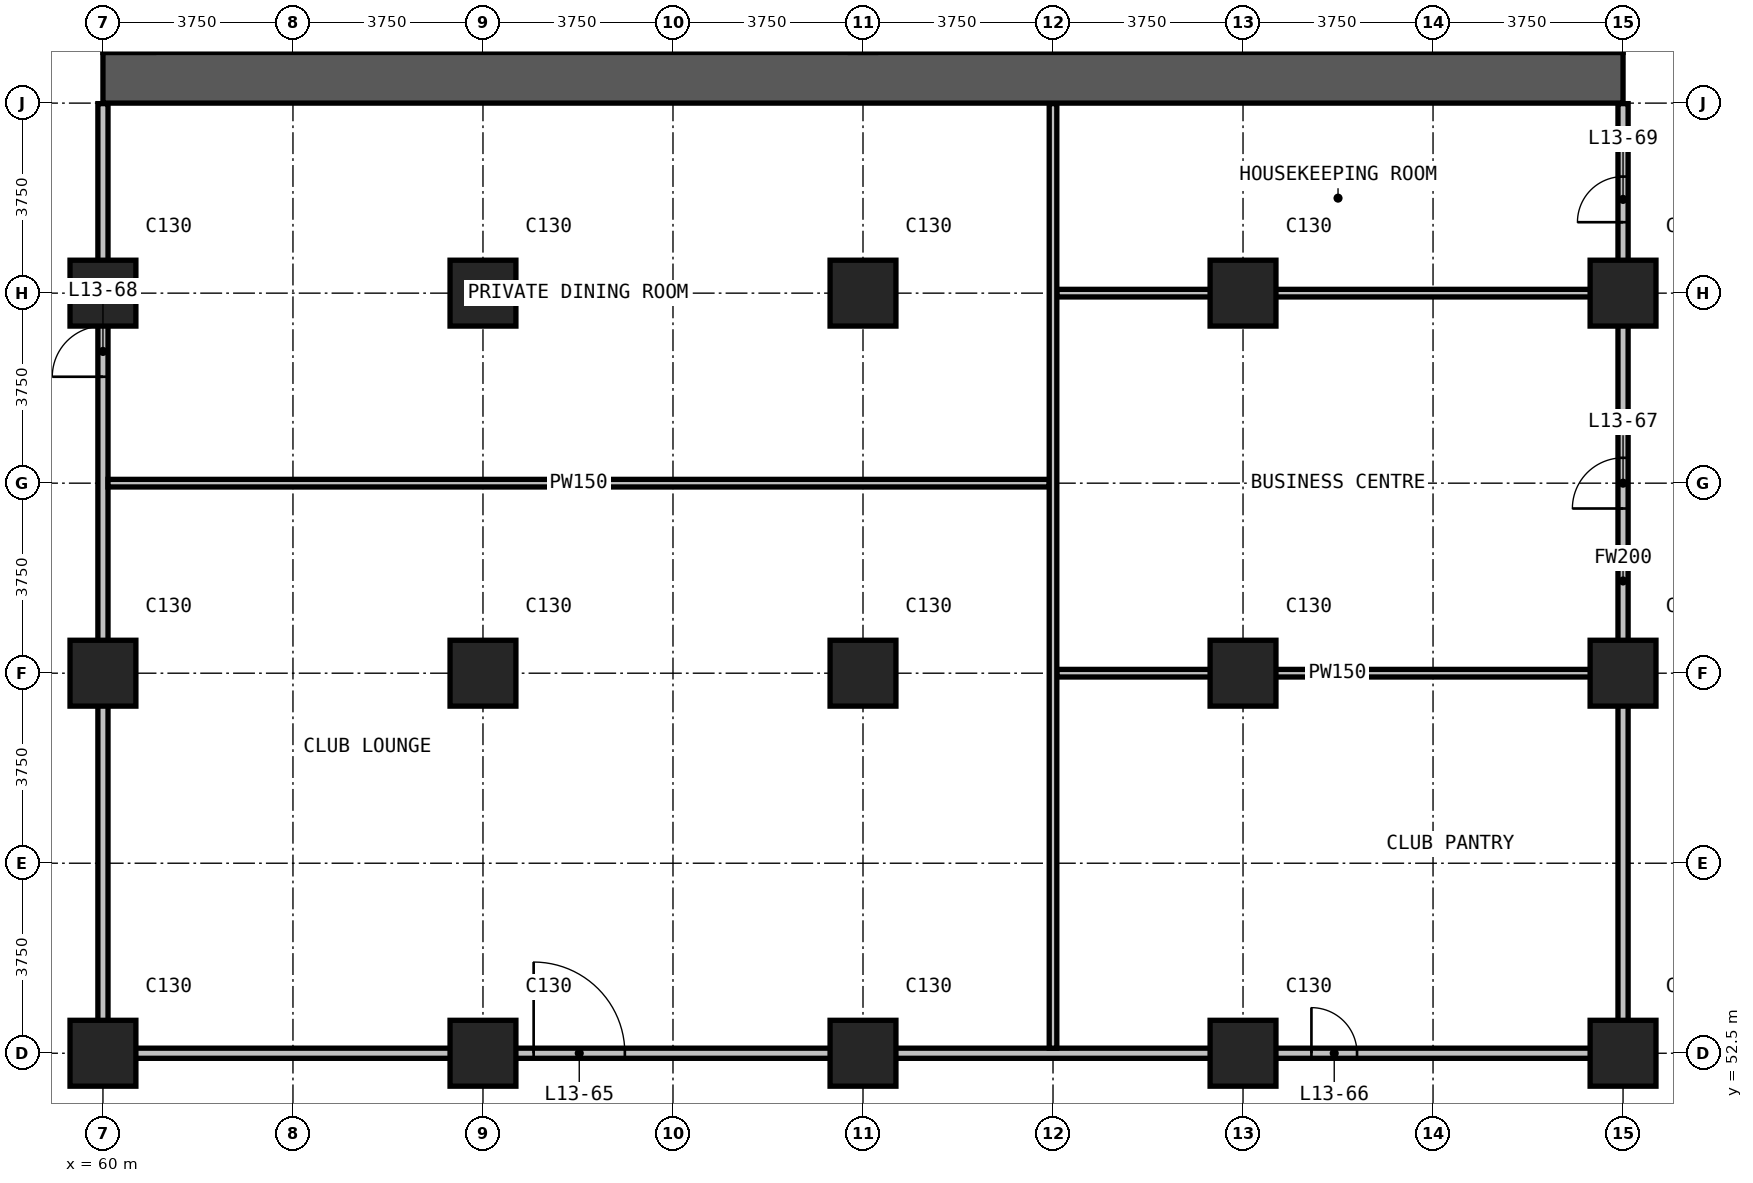
"""IFC4 building model, lengths in metres.
Left out: names, types, materials, properties, quantities, classifications, styles, units other than length and angle.
Written with IfcOpenShell. Run it as: python <this file> out.ifc"""

import sys

from ifc_helpers import new_model, si_unit, direction, frame, frame_2d, origin, origin_2d, place, context, subcontext, project, spatial, rectangle, extrude, element, fill, save


model = new_model("IFC4")
c1 = context("Model", 3, precision=1e-05, world=origin(), true_north=direction((0.0, 1.0)))
c2 = subcontext(c1, "Body", "Model", "MODEL_VIEW")
j1 = project(units=[si_unit("LENGTHUNIT", "METRE"), si_unit("PLANEANGLEUNIT", "RADIAN")], contexts=[c1])
p1 = place(None, origin())
s1 = spatial("IfcSite", under=j1, at=p1, CompositionType="ELEMENT")
p2 = place(p1, origin())
s2 = spatial("IfcBuilding", under=s1, at=p2, CompositionType="ELEMENT")
p3 = place(p2, frame((0.0, 0.0, 62.6)))
s3 = spatial("IfcBuildingStorey", under=s2, at=p3, CompositionType="ELEMENT", Elevation=62.6)
for number, where, z_axis, x_axis in (
    (1, (60.0, 52.5, 0.0), (0.0, 0.0, 1.0), (1.0, 0.0, 0.0)),
    (2, (60.0, 60.0, 0.0), (0.0, 0.0, 1.0), (1.0, 0.0, 0.0)),
    (3, (60.0, 67.5, 0.0), (0.0, 0.0, 1.0), (1.0, 0.0, 0.0)),
    (4, (67.5, 52.5, 0.0), (0.0, 0.0, 1.0), (1.0, 0.0, 0.0)),
    (5, (67.5, 60.0, 0.0), (0.0, 0.0, 1.0), (1.0, 0.0, 0.0)),
    (6, (67.5, 67.5, 0.0), (0.0, 0.0, 1.0), (1.0, 0.0, 0.0)),
    (7, (75.0, 52.5, 0.0), (0.0, 0.0, 1.0), (1.0, 0.0, 0.0)),
    (8, (75.0, 60.0, 0.0), (0.0, 0.0, 1.0), (1.0, 0.0, 0.0)),
    (9, (75.0, 67.5, 0.0), (0.0, 0.0, 1.0), (1.0, 0.0, 0.0)),
    (10, (82.5, 52.5, 0.0), (0.0, 0.0, 1.0), (1.0, 0.0, 0.0)),
    (11, (82.5, 60.0, 0.0), (0.0, 0.0, 1.0), (1.0, 0.0, 0.0)),
    (12, (82.5, 67.5, 0.0), (0.0, 0.0, 1.0), (1.0, 0.0, 0.0)),
    (13, (90.0, 52.5, 0.0), (0.0, 0.0, 1.0), (1.0, 0.0, 0.0)),
    (14, (90.0, 60.0, 0.0), (0.0, 0.0, 1.0), (1.0, 0.0, 0.0)),
    (15, (90.0, 67.5, 0.0), (0.0, 0.0, 1.0), (1.0, 0.0, 0.0)),
):
    element("IfcColumn", number, at=place(p3, frame(where, z_axis=z_axis, x_axis=x_axis)), inside=s3, PredefinedType="COLUMN", context=c2, shape_type="SweptSolid", body=[
        extrude(rectangle(XDim=1.3, YDim=1.3, at=origin_2d()), origin(), (0.0, 0.0, 1.0), 3.3),
    ])
p4 = place(p3, frame((60.0, 71.75, 0.0), z_axis=(0.0, 0.0, 1.0), x_axis=(1.0, 0.0, 0.0)))
e16 = element("IfcWall", 16, at=p4, inside=s3, PredefinedType="SHEAR", context=c2, shape_type="SweptSolid", body=[
    extrude(rectangle(XDim=30.0, YDim=1.0, at=frame_2d((15.0, 0.0))), origin(), (0.0, 0.0, 1.0), 3.3),
])
p5 = place(p3, frame((60.1, 52.5, 0.0), z_axis=(0.0, 0.0, 1.0), x_axis=(1.0, 0.0, 0.0)))
e17 = element("IfcWall", 17, at=p5, inside=s3, PredefinedType="PARTITIONING", context=c2, shape_type="SweptSolid", body=[
    extrude(rectangle(XDim=29.8, YDim=0.2, at=frame_2d((14.9, 0.0))), origin(), (0.0, 0.0, 1.0), 3.0),
])
p6 = place(p5, frame((8.4, 0.0, 0.0)))
e18 = element("IfcOpeningElement", 18, at=p6, cuts=e17, PredefinedType="OPENING", context=c2, shape_type="SweptSolid", body=[
    extrude(rectangle(XDim=1.8, YDim=2.2, at=frame_2d((0.9, 1.1))), frame((0.0, 0.11, 0.0), z_axis=(0.0, -1.0, 0.0), x_axis=(1.0, 0.0, 0.0)), (0.0, 0.0, 1.0), 0.22),
])
p7 = place(p5, frame((23.75, 0.0, 0.0)))
e19 = element("IfcOpeningElement", 19, at=p7, cuts=e17, PredefinedType="OPENING", context=c2, shape_type="SweptSolid", body=[
    extrude(rectangle(XDim=0.9, YDim=2.2, at=frame_2d((0.45, 1.1))), frame((0.0, 0.11, 0.0), z_axis=(0.0, -1.0, 0.0), x_axis=(1.0, 0.0, 0.0)), (0.0, 0.0, 1.0), 0.22),
])
p8 = place(p3, frame((60.0, 52.4, 0.0), z_axis=(0.0, 0.0, 1.0), x_axis=(0.0, 1.0, 0.0)))
e20 = element("IfcWall", 20, at=p8, inside=s3, PredefinedType="PARTITIONING", context=c2, shape_type="SweptSolid", body=[
    extrude(rectangle(XDim=18.84, YDim=0.2, at=frame_2d((9.42, 0.0))), origin(), (0.0, 0.0, 1.0), 3.0),
])
p9 = place(p8, frame((13.45, 0.0, 0.0)))
e21 = element("IfcOpeningElement", 21, at=p9, cuts=e20, PredefinedType="OPENING", context=c2, shape_type="SweptSolid", body=[
    extrude(rectangle(XDim=1.0, YDim=2.2, at=frame_2d((0.5, 1.1))), frame((0.0, 0.11, 0.0), z_axis=(0.0, -1.0, 0.0), x_axis=(1.0, 0.0, 0.0)), (0.0, 0.0, 1.0), 0.22),
])
p10 = place(p3, frame((90.0, 52.4, 0.0), z_axis=(0.0, 0.0, 1.0), x_axis=(0.0, 1.0, 0.0)))
e22 = element("IfcWall", 22, at=p10, inside=s3, PredefinedType="PARTITIONING", context=c2, shape_type="SweptSolid", body=[
    extrude(rectangle(XDim=18.84, YDim=0.2, at=frame_2d((9.42, 0.0))), origin(), (0.0, 0.0, 1.0), 3.0),
])
p11 = place(p10, frame((10.85, 0.0, 0.0)))
e23 = element("IfcOpeningElement", 23, at=p11, cuts=e22, PredefinedType="OPENING", context=c2, shape_type="SweptSolid", body=[
    extrude(rectangle(XDim=1.0, YDim=2.2, at=frame_2d((0.5, 1.1))), frame((0.0, 0.11, 0.0), z_axis=(0.0, -1.0, 0.0), x_axis=(1.0, 0.0, 0.0)), (0.0, 0.0, 1.0), 0.22),
])
p12 = place(p10, frame((16.5, 0.0, 0.0)))
e24 = element("IfcOpeningElement", 24, at=p12, cuts=e22, PredefinedType="OPENING", context=c2, shape_type="SweptSolid", body=[
    extrude(rectangle(XDim=0.9, YDim=2.2, at=frame_2d((0.45, 1.1))), frame((0.0, 0.11, 0.0), z_axis=(0.0, -1.0, 0.0), x_axis=(1.0, 0.0, 0.0)), (0.0, 0.0, 1.0), 0.22),
])
p13 = place(p3, frame((78.825, 60.0, 0.0), z_axis=(0.0, 0.0, 1.0), x_axis=(1.0, 0.0, 0.0)))
e25 = element("IfcWall", 25, at=p13, inside=s3, PredefinedType="PARTITIONING", context=c2, shape_type="SweptSolid", body=[
    extrude(rectangle(XDim=11.075, YDim=0.15, at=frame_2d((5.538, 0.0))), origin(), (0.0, 0.0, 1.0), 3.0),
])
p14 = place(p3, frame((60.1, 63.75, 0.0), z_axis=(0.0, 0.0, 1.0), x_axis=(1.0, 0.0, 0.0)))
e26 = element("IfcWall", 26, at=p14, inside=s3, PredefinedType="PARTITIONING", context=c2, shape_type="SweptSolid", body=[
    extrude(rectangle(XDim=18.575, YDim=0.15, at=frame_2d((9.288, 0.0))), origin(), (0.0, 0.0, 1.0), 3.0),
])
p15 = place(p3, frame((78.825, 67.5, 0.0), z_axis=(0.0, 0.0, 1.0), x_axis=(1.0, 0.0, 0.0)))
e27 = element("IfcWall", 27, at=p15, inside=s3, PredefinedType="PARTITIONING", context=c2, shape_type="SweptSolid", body=[
    extrude(rectangle(XDim=11.075, YDim=0.15, at=frame_2d((5.538, 0.0))), origin(), (0.0, 0.0, 1.0), 3.0),
])
p16 = place(p3, frame((78.75, 52.6, 0.0), z_axis=(0.0, 0.0, 1.0), x_axis=(0.0, 1.0, 0.0)))
e28 = element("IfcWall", 28, at=p16, inside=s3, PredefinedType="PARTITIONING", context=c2, shape_type="SweptSolid", body=[
    extrude(rectangle(XDim=18.64, YDim=0.15, at=frame_2d((9.32, 0.0))), origin(), (0.0, 0.0, 1.0), 3.0),
])
p17 = place(p6, origin())
e29 = element("IfcDoor", 29, at=p17, inside=s3, OperationType="DOUBLE_DOOR_SINGLE_SWING", PredefinedType="DOOR", context=c2, shape_type="SweptSolid", body=[
    extrude(rectangle(XDim=1.8, YDim=2.2, at=frame_2d((0.9, 1.1))), frame((0.0, 0.025, 0.0), z_axis=(0.0, -1.0, 0.0), x_axis=(1.0, 0.0, 0.0)), (0.0, 0.0, 1.0), 0.05),
])
fill(e18, e29)
p18 = place(p7, origin())
e30 = element("IfcDoor", 30, at=p18, inside=s3, OperationType="SINGLE_SWING_RIGHT", PredefinedType="DOOR", context=c2, shape_type="SweptSolid", body=[
    extrude(rectangle(XDim=0.9, YDim=2.2, at=frame_2d((0.45, 1.1))), frame((0.0, 0.025, 0.0), z_axis=(0.0, -1.0, 0.0), x_axis=(1.0, 0.0, 0.0)), (0.0, 0.0, 1.0), 0.05),
])
fill(e19, e30)
p19 = place(p11, origin())
e31 = element("IfcDoor", 31, at=p19, inside=s3, OperationType="SINGLE_SWING_LEFT", PredefinedType="DOOR", context=c2, shape_type="SweptSolid", body=[
    extrude(rectangle(XDim=1.0, YDim=2.2, at=frame_2d((0.5, 1.1))), frame((0.0, 0.025, 0.0), z_axis=(0.0, -1.0, 0.0), x_axis=(1.0, 0.0, 0.0)), (0.0, 0.0, 1.0), 0.05),
])
fill(e23, e31)
p20 = place(p9, origin())
e32 = element("IfcDoor", 32, at=p20, inside=s3, OperationType="SINGLE_SWING_LEFT", PredefinedType="DOOR", context=c2, shape_type="SweptSolid", body=[
    extrude(rectangle(XDim=1.0, YDim=2.2, at=frame_2d((0.5, 1.1))), frame((0.0, 0.025, 0.0), z_axis=(0.0, -1.0, 0.0), x_axis=(1.0, 0.0, 0.0)), (0.0, 0.0, 1.0), 0.05),
])
fill(e21, e32)
p21 = place(p12, origin())
e33 = element("IfcDoor", 33, at=p21, inside=s3, OperationType="SINGLE_SWING_RIGHT", PredefinedType="DOOR", context=c2, shape_type="SweptSolid", body=[
    extrude(rectangle(XDim=0.9, YDim=2.2, at=frame_2d((0.45, 1.1))), frame((0.0, 0.025, 0.0), z_axis=(0.0, -1.0, 0.0), x_axis=(1.0, 0.0, 0.0)), (0.0, 0.0, 1.0), 0.05),
])
fill(e24, e33)
save(model, sys.argv[1])
